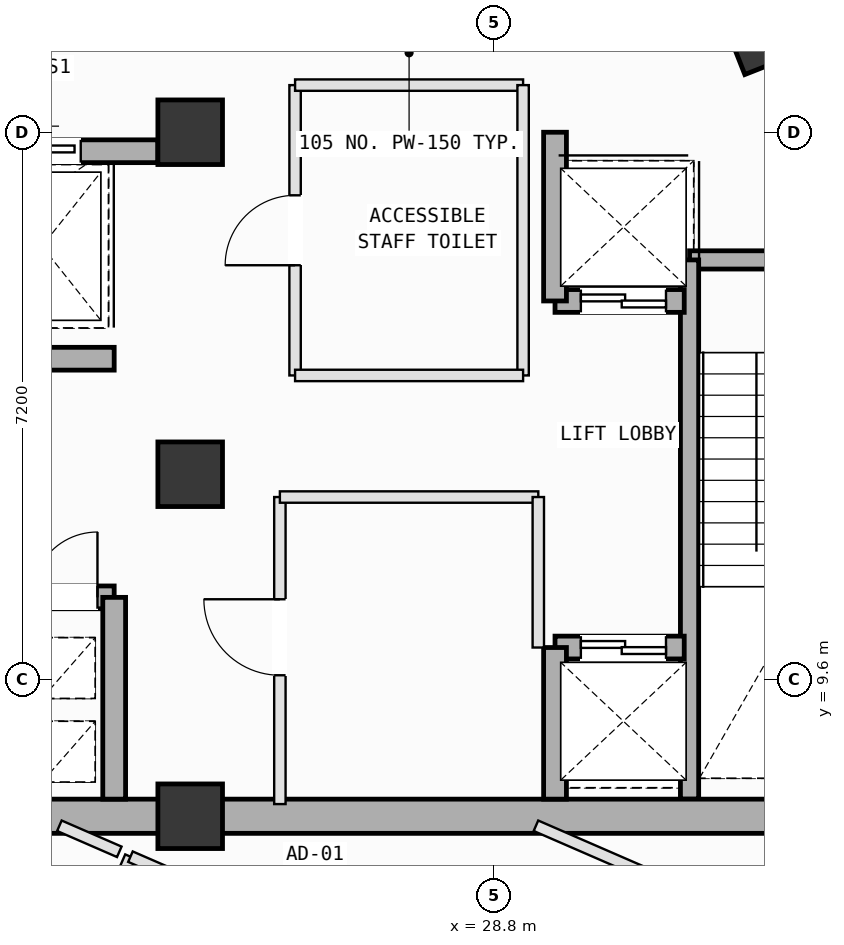
"""IFC4 building model, lengths in metres.
Left out: names, types, materials, properties, quantities, classifications, styles, units other than length and angle.
Written with IfcOpenShell. Run it as: python <this file> out.ifc"""

import sys

from ifc_helpers import new_model, si_unit, direction, frame, frame_2d, origin, origin_2d, place, context, subcontext, project, spatial, rectangle, extrude, element, fill, save


model = new_model("IFC4")
c1 = context("Model", 3, precision=1e-05, world=origin(), true_north=direction((0.0, 1.0)))
c2 = subcontext(c1, "Body", "Model", "MODEL_VIEW")
j1 = project(units=[si_unit("LENGTHUNIT", "METRE"), si_unit("PLANEANGLEUNIT", "RADIAN")], contexts=[c1])
p1 = place(None, origin())
s1 = spatial("IfcSite", under=j1, at=p1, CompositionType="ELEMENT")
p2 = place(p1, origin())
s2 = spatial("IfcBuilding", under=s1, at=p2, CompositionType="ELEMENT")
p3 = place(p2, frame((0.0, 0.0, 324.6)))
s3 = spatial("IfcBuildingStorey", under=s2, at=p3, CompositionType="ELEMENT", Elevation=324.6)
for number, where, z_axis, x_axis in (
    (1, (24.8, 7.8, 0.0), (0.0, 0.0, 1.0), (1.0, 0.0, 0.0)),
    (2, (24.8, 12.3, 0.0), (0.0, 0.0, 1.0), (1.0, 0.0, 0.0)),
    (3, (24.8, 16.8, 0.0), (0.0, 0.0, 1.0), (1.0, 0.0, 0.0)),
):
    element("IfcColumn", number, at=place(p3, frame(where, z_axis=z_axis, x_axis=x_axis)), inside=s3, PredefinedType="COLUMN", context=c2, shape_type="SweptSolid", body=[
        extrude(rectangle(XDim=0.85, YDim=0.85, at=origin_2d()), origin(), (0.0, 0.0, 1.0), 4.0),
    ])
p4 = place(p3, frame((32.226, 18.255, 0.002), z_axis=(0.0, 0.0, 1.0), x_axis=(-0.366501226724, 0.930417567982, 0.0)))
e4 = element("IfcColumn", 4, at=p4, inside=s3, PredefinedType="COLUMN", context=c2, shape_type="SweptSolid", body=[
    extrude(rectangle(XDim=1.2, YDim=0.75, at=origin_2d()), origin(), (0.0, 0.0, 1.0), 3.996),
])
p5 = place(p3, frame((31.37, 15.12, 0.0), z_axis=(0.0, 0.0, 1.0), x_axis=(1.0, 0.0, 0.0)))
e5 = element("IfcWall", 5, at=p5, inside=s3, PredefinedType="SOLIDWALL", context=c2, shape_type="SweptSolid", body=[
    extrude(rectangle(XDim=3.46, YDim=0.24, at=frame_2d((1.73, 0.0))), origin(), (0.0, 0.0, 1.0), 3.78),
])
p6 = place(p5, frame((2.14, 0.0, 0.0)))
e6 = element("IfcOpeningElement", 6, at=p6, cuts=e5, PredefinedType="OPENING", context=c2, shape_type="SweptSolid", body=[
    extrude(rectangle(XDim=1.1, YDim=2.15, at=frame_2d((0.55, 1.075))), frame((0.0, 0.13, 0.0), z_axis=(0.0, -1.0, 0.0), x_axis=(1.0, 0.0, 0.0)), (0.0, 0.0, 1.0), 0.26),
])
p7 = place(p3, frame((31.37, 8.025, 0.0), z_axis=(0.0, 0.0, 1.0), x_axis=(0.0, 1.0, 0.0)))
e7 = element("IfcWall", 7, at=p7, inside=s3, PredefinedType="SOLIDWALL", context=c2, shape_type="SweptSolid", body=[
    extrude(rectangle(XDim=7.095, YDim=0.24, at=frame_2d((3.548, 0.0))), origin(), (0.0, 0.0, 1.0), 3.78),
])
for number, where, z_axis, x_axis in (
    (8, (14.0, 7.8, 0.0), (0.0, 0.0, 1.0), (1.0, 0.0, 0.0)),
    (9, (24.8, 7.8, 0.0), (0.0, 0.0, 1.0), (1.0, 0.0, 0.0)),
):
    element("IfcWall", number, at=place(p3, frame(where, z_axis=z_axis, x_axis=x_axis)), inside=s3, PredefinedType="SHEAR", context=c2, shape_type="SweptSolid", body=[
        extrude(rectangle(XDim=10.8, YDim=0.45, at=frame_2d((5.4, 0.0))), origin(), (0.0, 0.0, 1.0), 3.78),
    ])
p8 = place(p3, frame((19.85, 16.55, 0.0), z_axis=(0.0, 0.0, 1.0), x_axis=(1.0, 0.0, 0.0)))
e10 = element("IfcWall", 10, at=p8, inside=s3, PredefinedType="SOLIDWALL", context=c2, shape_type="SweptSolid", body=[
    extrude(rectangle(XDim=4.525, YDim=0.3, at=frame_2d((2.262, 0.0))), origin(), (0.0, 0.0, 1.0), 3.78),
])
p9 = place(p8, frame((0.475, 0.0, 0.0)))
e11 = element("IfcOpeningElement", 11, at=p9, cuts=e10, PredefinedType="OPENING", context=c2, shape_type="SweptSolid", body=[
    extrude(rectangle(XDim=1.25, YDim=2.18, at=frame_2d((0.625, 1.09))), frame((0.0, 0.16, 0.0), z_axis=(0.0, -1.0, 0.0), x_axis=(1.0, 0.0, 0.0)), (0.0, 0.0, 1.0), 0.32),
])
p10 = place(p8, frame((2.49, 0.0, 0.0)))
e12 = element("IfcOpeningElement", 12, at=p10, cuts=e10, PredefinedType="OPENING", context=c2, shape_type="SweptSolid", body=[
    extrude(rectangle(XDim=1.02, YDim=2.12, at=frame_2d((0.51, 1.06))), frame((0.0, 0.16, 0.0), z_axis=(0.0, -1.0, 0.0), x_axis=(1.0, 0.0, 0.0)), (0.0, 0.0, 1.0), 0.32),
])
p11 = place(p3, frame((18.5, 10.68, 0.0), z_axis=(0.0, 0.0, 1.0), x_axis=(1.0, 0.0, 0.0)))
e13 = element("IfcWall", 13, at=p11, inside=s3, PredefinedType="SOLIDWALL", context=c2, shape_type="SweptSolid", body=[
    extrude(rectangle(XDim=5.3, YDim=0.3, at=frame_2d((2.65, 0.0))), origin(), (0.0, 0.0, 1.0), 3.78),
])
p12 = place(p11, frame((4.22, 0.0, 0.0)))
e14 = element("IfcOpeningElement", 14, at=p12, cuts=e13, PredefinedType="OPENING", context=c2, shape_type="SweptSolid", body=[
    extrude(rectangle(XDim=0.86, YDim=2.06, at=frame_2d((0.43, 1.03))), frame((0.0, 0.16, 0.0), z_axis=(0.0, -1.0, 0.0), x_axis=(1.0, 0.0, 0.0)), (0.0, 0.0, 1.0), 0.32),
])
p13 = place(p11, frame((0.425, 0.0, 0.0)))
e15 = element("IfcOpeningElement", 15, at=p13, cuts=e13, PredefinedType="OPENING", context=c2, shape_type="SweptSolid", body=[
    extrude(rectangle(XDim=1.25, YDim=2.18, at=frame_2d((0.625, 1.09))), frame((0.0, 0.16, 0.0), z_axis=(0.0, -1.0, 0.0), x_axis=(1.0, 0.0, 0.0)), (0.0, 0.0, 1.0), 0.32),
])
p14 = place(p11, frame((2.525, 0.0, 0.0)))
e16 = element("IfcOpeningElement", 16, at=p14, cuts=e13, PredefinedType="OPENING", context=c2, shape_type="SweptSolid", body=[
    extrude(rectangle(XDim=1.25, YDim=2.18, at=frame_2d((0.625, 1.09))), frame((0.0, 0.16, 0.0), z_axis=(0.0, -1.0, 0.0), x_axis=(1.0, 0.0, 0.0)), (0.0, 0.0, 1.0), 0.32),
])
p15 = place(p3, frame((18.5, 13.82, 0.0), z_axis=(0.0, 0.0, 1.0), x_axis=(1.0, 0.0, 0.0)))
e17 = element("IfcWall", 17, at=p15, inside=s3, PredefinedType="SOLIDWALL", context=c2, shape_type="SweptSolid", body=[
    extrude(rectangle(XDim=5.3, YDim=0.3, at=frame_2d((2.65, 0.0))), origin(), (0.0, 0.0, 1.0), 3.78),
])
p16 = place(p15, frame((0.18, 0.0, 0.0)))
e18 = element("IfcOpeningElement", 18, at=p16, cuts=e17, PredefinedType="OPENING", context=c2, shape_type="SweptSolid", body=[
    extrude(rectangle(XDim=1.1, YDim=2.15, at=frame_2d((0.55, 1.075))), frame((0.0, 0.16, 0.0), z_axis=(0.0, -1.0, 0.0), x_axis=(1.0, 0.0, 0.0)), (0.0, 0.0, 1.0), 0.32),
])
p17 = place(p3, frame((23.8, 8.025, 0.0), z_axis=(0.0, 0.0, 1.0), x_axis=(0.0, 1.0, 0.0)))
e19 = element("IfcWall", 19, at=p17, inside=s3, PredefinedType="SOLIDWALL", context=c2, shape_type="SweptSolid", body=[
    extrude(rectangle(XDim=2.655, YDim=0.3, at=frame_2d((1.328, 0.0))), origin(), (0.0, 0.0, 1.0), 3.78),
])
p18 = place(p3, frame((29.6, 10.02, 0.0), z_axis=(0.0, 0.0, 1.0), x_axis=(1.0, 0.0, 0.0)))
e20 = element("IfcWall", 20, at=p18, inside=s3, PredefinedType="SOLIDWALL", context=c2, shape_type="SweptSolid", body=[
    extrude(rectangle(XDim=1.7, YDim=0.3, at=frame_2d((0.85, 0.0))), origin(), (0.0, 0.0, 1.0), 3.78),
])
p19 = place(p18, frame((0.34, 0.0, 0.0)))
e21 = element("IfcOpeningElement", 21, at=p19, cuts=e20, PredefinedType="OPENING", context=c2, shape_type="SweptSolid", body=[
    extrude(rectangle(XDim=1.12, YDim=2.15, at=frame_2d((0.56, 1.075))), frame((0.0, 0.16, 0.0), z_axis=(0.0, -1.0, 0.0), x_axis=(1.0, 0.0, 0.0)), (0.0, 0.0, 1.0), 0.32),
])
p20 = place(p3, frame((29.6, 8.025, 0.0), z_axis=(0.0, 0.0, 1.0), x_axis=(0.0, 1.0, 0.0)))
e22 = element("IfcWall", 22, at=p20, inside=s3, PredefinedType="SOLIDWALL", context=c2, shape_type="SweptSolid", body=[
    extrude(rectangle(XDim=1.995, YDim=0.3, at=frame_2d((0.998, 0.0))), origin(), (0.0, 0.0, 1.0), 3.78),
])
p21 = place(p3, frame((29.6, 14.58, 0.0), z_axis=(0.0, 0.0, 1.0), x_axis=(1.0, 0.0, 0.0)))
e23 = element("IfcWall", 23, at=p21, inside=s3, PredefinedType="SOLIDWALL", context=c2, shape_type="SweptSolid", body=[
    extrude(rectangle(XDim=1.7, YDim=0.3, at=frame_2d((0.85, 0.0))), origin(), (0.0, 0.0, 1.0), 3.78),
])
p22 = place(p21, frame((0.34, 0.0, 0.0)))
e24 = element("IfcOpeningElement", 24, at=p22, cuts=e23, PredefinedType="OPENING", context=c2, shape_type="SweptSolid", body=[
    extrude(rectangle(XDim=1.12, YDim=2.15, at=frame_2d((0.56, 1.075))), frame((0.0, 0.16, 0.0), z_axis=(0.0, -1.0, 0.0), x_axis=(1.0, 0.0, 0.0)), (0.0, 0.0, 1.0), 0.32),
])
p23 = place(p3, frame((29.6, 14.58, 0.0), z_axis=(0.0, 0.0, 1.0), x_axis=(0.0, 1.0, 0.0)))
e25 = element("IfcWall", 25, at=p23, inside=s3, PredefinedType="SOLIDWALL", context=c2, shape_type="SweptSolid", body=[
    extrude(rectangle(XDim=2.22, YDim=0.3, at=frame_2d((1.11, 0.0))), origin(), (0.0, 0.0, 1.0), 3.78),
])
p24 = place(p3, frame((25.98, 7.96, 0.0), z_axis=(0.0, 0.0, 1.0), x_axis=(0.0, 1.0, 0.0)))
e26 = element("IfcWall", 26, at=p24, inside=s3, PredefinedType="PARTITIONING", context=c2, shape_type="SweptSolid", body=[
    extrude(rectangle(XDim=4.04, YDim=0.15, at=frame_2d((2.02, 0.0))), origin(), (0.0, 0.0, 1.0), 3.78),
])
p25 = place(p24, frame((1.695, 0.0, 0.0)))
e27 = element("IfcOpeningElement", 27, at=p25, cuts=e26, PredefinedType="OPENING", context=c2, shape_type="SweptSolid", body=[
    extrude(rectangle(XDim=1.0, YDim=2.12, at=frame_2d((0.5, 1.06))), frame((0.0, 0.085, 0.0), z_axis=(0.0, -1.0, 0.0), x_axis=(1.0, 0.0, 0.0)), (0.0, 0.0, 1.0), 0.17),
])
p26 = place(p3, frame((25.98, 12.0, 0.0), z_axis=(0.0, 0.0, 1.0), x_axis=(1.0, 0.0, 0.0)))
e28 = element("IfcWall", 28, at=p26, inside=s3, PredefinedType="PARTITIONING", context=c2, shape_type="SweptSolid", body=[
    extrude(rectangle(XDim=3.4, YDim=0.15, at=frame_2d((1.7, 0.0))), origin(), (0.0, 0.0, 1.0), 3.78),
])
p27 = place(p3, frame((29.38, 12.0, 0.0), z_axis=(0.0, 0.0, 1.0), x_axis=(0.0, -1.0, 0.0)))
e29 = element("IfcWall", 29, at=p27, inside=s3, PredefinedType="PARTITIONING", context=c2, shape_type="SweptSolid", body=[
    extrude(rectangle(XDim=1.98, YDim=0.15, at=frame_2d((0.99, 0.0))), origin(), (0.0, 0.0, 1.0), 3.78),
])
p28 = place(p3, frame((26.18, 13.6, 0.0), z_axis=(0.0, 0.0, 1.0), x_axis=(0.0, 1.0, 0.0)))
e30 = element("IfcWall", 30, at=p28, inside=s3, PredefinedType="PARTITIONING", context=c2, shape_type="SweptSolid", body=[
    extrude(rectangle(XDim=3.82, YDim=0.15, at=frame_2d((1.91, 0.0))), origin(), (0.0, 0.0, 1.0), 3.78),
])
p29 = place(p28, frame((1.45, 0.0, 0.0)))
e31 = element("IfcOpeningElement", 31, at=p29, cuts=e30, PredefinedType="OPENING", context=c2, shape_type="SweptSolid", body=[
    extrude(rectangle(XDim=0.92, YDim=2.1, at=frame_2d((0.46, 1.05))), frame((0.0, 0.085, 0.0), z_axis=(0.0, -1.0, 0.0), x_axis=(1.0, 0.0, 0.0)), (0.0, 0.0, 1.0), 0.17),
])
p30 = place(p3, frame((26.18, 17.42, 0.0), z_axis=(0.0, 0.0, 1.0), x_axis=(1.0, 0.0, 0.0)))
e32 = element("IfcWall", 32, at=p30, inside=s3, PredefinedType="PARTITIONING", context=c2, shape_type="SweptSolid", body=[
    extrude(rectangle(XDim=3.0, YDim=0.15, at=frame_2d((1.5, 0.0))), origin(), (0.0, 0.0, 1.0), 3.78),
])
p31 = place(p3, frame((29.18, 17.42, 0.0), z_axis=(0.0, 0.0, 1.0), x_axis=(0.0, -1.0, 0.0)))
e33 = element("IfcWall", 33, at=p31, inside=s3, PredefinedType="PARTITIONING", context=c2, shape_type="SweptSolid", body=[
    extrude(rectangle(XDim=3.82, YDim=0.15, at=frame_2d((1.91, 0.0))), origin(), (0.0, 0.0, 1.0), 3.78),
])
p32 = place(p3, frame((29.18, 13.6, 0.0), z_axis=(0.0, 0.0, 1.0), x_axis=(-1.0, 0.0, 0.0)))
e34 = element("IfcWall", 34, at=p32, inside=s3, PredefinedType="PARTITIONING", context=c2, shape_type="SweptSolid", body=[
    extrude(rectangle(XDim=3.0, YDim=0.15, at=frame_2d((1.5, 0.0))), origin(), (0.0, 0.0, 1.0), 3.78),
])
p33 = place(p3, frame((20.912, 0.134, 0.0), z_axis=(0.0, 0.0, 1.0), x_axis=(0.398731849313, 0.917067561493, 0.0)))
e35 = element("IfcWall", 35, at=p33, inside=s3, PredefinedType="PARTITIONING", context=c2, shape_type="SweptSolid", body=[
    extrude(rectangle(XDim=7.779, YDim=0.15, at=frame_2d((3.89, 0.0))), origin(), (0.0, 0.0, 1.0), 2.765),
])
p34 = place(p33, frame((3.46, 0.0, 0.0)))
e36 = element("IfcOpeningElement", 36, at=p34, cuts=e35, PredefinedType="OPENING", context=c2, shape_type="SweptSolid", body=[
    extrude(rectangle(XDim=0.86, YDim=2.06, at=frame_2d((0.43, 1.03))), frame((0.0, 0.085, 0.0), z_axis=(0.0, -1.0, 0.0), x_axis=(1.0, 0.0, 0.0)), (0.0, 0.0, 1.0), 0.17),
])
p35 = place(p3, frame((24.014, 7.268, 0.0), z_axis=(0.0, 0.0, 1.0), x_axis=(0.91706671013, -0.398733807411, 0.0)))
e37 = element("IfcWall", 37, at=p35, inside=s3, PredefinedType="PARTITIONING", context=c2, shape_type="SweptSolid", body=[
    extrude(rectangle(XDim=4.64, YDim=0.15, at=frame_2d((2.32, 0.0))), origin(), (0.0, 0.0, 1.0), 3.78),
])
p36 = place(p35, frame((1.89, 0.0, 0.0)))
e38 = element("IfcOpeningElement", 38, at=p36, cuts=e37, PredefinedType="OPENING", context=c2, shape_type="SweptSolid", body=[
    extrude(rectangle(XDim=0.86, YDim=2.06, at=frame_2d((0.43, 1.03))), frame((0.0, 0.085, 0.0), z_axis=(0.0, -1.0, 0.0), x_axis=(1.0, 0.0, 0.0)), (0.0, 0.0, 1.0), 0.17),
])
p37 = place(p3, frame((23.079, 7.675, 0.0), z_axis=(0.0, 0.0, 1.0), x_axis=(0.91686666905, -0.399193576082, 0.0)))
e39 = element("IfcWall", 39, at=p37, inside=s3, PredefinedType="PARTITIONING", context=c2, shape_type="SweptSolid", body=[
    extrude(rectangle(XDim=0.859, YDim=0.15, at=frame_2d((0.43, 0.0))), origin(), (0.0, 0.0, 1.0), 3.78),
])
p38 = place(p3, frame((36.107, 4.736, 0.0), z_axis=(0.0, 0.0, 1.0), x_axis=(-0.917031075712, 0.398815754676, 0.0)))
e40 = element("IfcWall", 40, at=p38, inside=s3, PredefinedType="PARTITIONING", context=c2, shape_type="SweptSolid", body=[
    extrude(rectangle(XDim=7.369, YDim=0.15, at=frame_2d((3.685, 0.0))), origin(), (0.0, 0.0, 1.0), 3.78),
])
p39 = place(p12, origin())
e41 = element("IfcDoor", 41, at=p39, inside=s3, OperationType="SINGLE_SWING_RIGHT", PredefinedType="DOOR", context=c2, shape_type="SweptSolid", body=[
    extrude(rectangle(XDim=0.86, YDim=2.06, at=frame_2d((0.43, 1.03))), frame((0.0, 0.025, 0.0), z_axis=(0.0, -1.0, 0.0), x_axis=(1.0, 0.0, 0.0)), (0.0, 0.0, 1.0), 0.05),
])
fill(e14, e41)
p40 = place(p19, origin())
e42 = element("IfcDoor", 42, at=p40, inside=s3, OperationType="DOUBLE_DOOR_SLIDING", PredefinedType="DOOR", context=c2, shape_type="SweptSolid", body=[
    extrude(rectangle(XDim=1.12, YDim=2.15, at=frame_2d((0.56, 1.075))), frame((0.0, 0.025, 0.0), z_axis=(0.0, -1.0, 0.0), x_axis=(1.0, 0.0, 0.0)), (0.0, 0.0, 1.0), 0.05),
])
fill(e21, e42)
p41 = place(p22, origin())
e43 = element("IfcDoor", 43, at=p41, inside=s3, OperationType="DOUBLE_DOOR_SLIDING", PredefinedType="DOOR", context=c2, shape_type="SweptSolid", body=[
    extrude(rectangle(XDim=1.12, YDim=2.15, at=frame_2d((0.56, 1.075))), frame((0.0, 0.025, 0.0), z_axis=(0.0, -1.0, 0.0), x_axis=(1.0, 0.0, 0.0)), (0.0, 0.0, 1.0), 0.05),
])
fill(e24, e43)
p42 = place(p10, origin())
e44 = element("IfcDoor", 44, at=p42, inside=s3, OperationType="SLIDING_TO_LEFT", PredefinedType="DOOR", context=c2, shape_type="SweptSolid", body=[
    extrude(rectangle(XDim=1.02, YDim=2.12, at=frame_2d((0.51, 1.06))), frame((0.0, 0.025, 0.0), z_axis=(0.0, -1.0, 0.0), x_axis=(1.0, 0.0, 0.0)), (0.0, 0.0, 1.0), 0.05),
])
fill(e12, e44)
p43 = place(p25, origin())
e45 = element("IfcDoor", 45, at=p43, inside=s3, OperationType="SINGLE_SWING_RIGHT", PredefinedType="DOOR", context=c2, shape_type="SweptSolid", body=[
    extrude(rectangle(XDim=1.0, YDim=2.12, at=frame_2d((0.5, 1.06))), frame((0.0, 0.025, 0.0), z_axis=(0.0, -1.0, 0.0), x_axis=(1.0, 0.0, 0.0)), (0.0, 0.0, 1.0), 0.05),
])
fill(e27, e45)
p44 = place(p29, origin())
e46 = element("IfcDoor", 46, at=p44, inside=s3, OperationType="SINGLE_SWING_LEFT", PredefinedType="DOOR", context=c2, shape_type="SweptSolid", body=[
    extrude(rectangle(XDim=0.92, YDim=2.1, at=frame_2d((0.46, 1.05))), frame((0.0, 0.025, 0.0), z_axis=(0.0, -1.0, 0.0), x_axis=(1.0, 0.0, 0.0)), (0.0, 0.0, 1.0), 0.05),
])
fill(e31, e46)
save(model, sys.argv[1])
